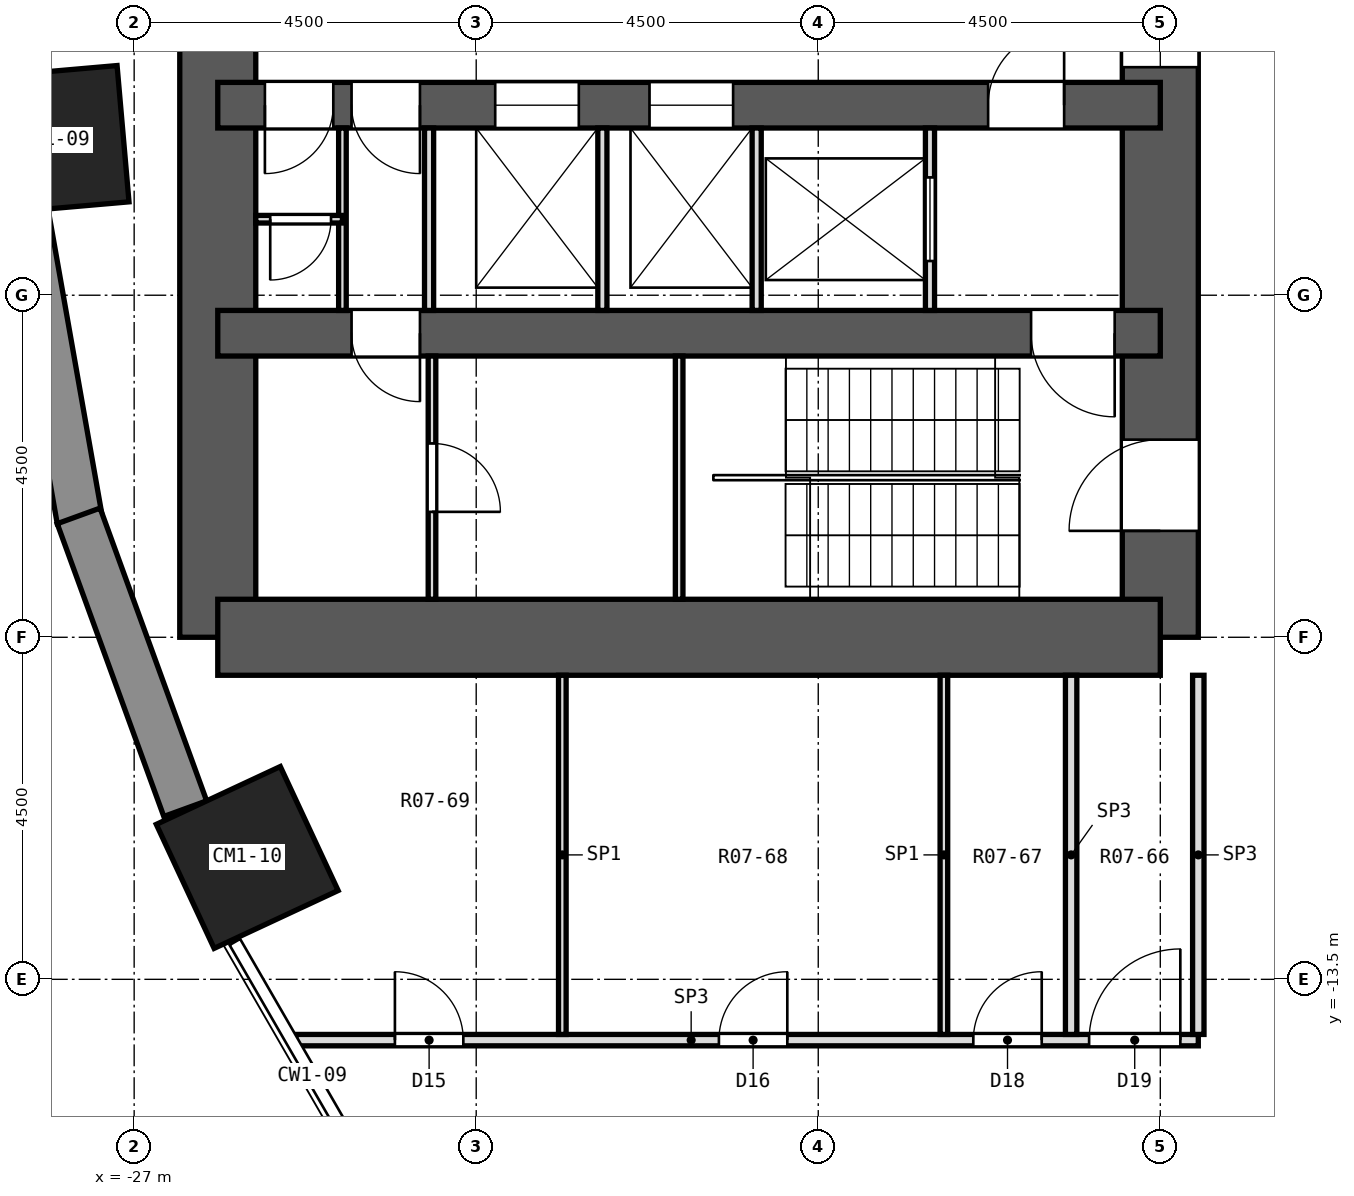
"""IFC4 building model, lengths in metres.
Left out: names, types, materials, properties, quantities, classifications, styles, units other than length and angle.
Written with IfcOpenShell. Run it as: python <this file> out.ifc"""

import sys

from ifc_helpers import new_model, si_unit, direction, frame, frame_2d, origin, origin_2d, place, context, subcontext, project, spatial, rectangle, extrude, element, fill, save


model = new_model("IFC4")
c1 = context("Model", 3, precision=1e-05, world=origin(), true_north=direction((0.0, 1.0)))
c2 = subcontext(c1, "Body", "Model", "MODEL_VIEW")
j1 = project(units=[si_unit("LENGTHUNIT", "METRE"), si_unit("PLANEANGLEUNIT", "RADIAN")], contexts=[c1])
p1 = place(None, origin())
s1 = spatial("IfcSite", under=j1, at=p1, CompositionType="ELEMENT")
p2 = place(p1, origin())
s2 = spatial("IfcBuilding", under=s1, at=p2, CompositionType="ELEMENT")
p3 = place(p2, frame((0.0, 0.0, 17.6)))
s3 = spatial("IfcBuildingStorey", under=s2, at=p3, CompositionType="ELEMENT", Elevation=17.6)
for number, where, z_axis, x_axis in (
    (1, (-28.043, -2.453, 0.0), (0.0, 0.0, 1.0), (-0.996, -0.087, 0.0)),
    (2, (-25.512, -11.897, 0.0), (0.0, 0.0, 1.0), (-0.906, -0.423, 0.0)),
):
    element("IfcColumn", number, at=place(p3, frame(where, z_axis=z_axis, x_axis=x_axis)), inside=s3, PredefinedType="COLUMN", context=c2, shape_type="SweptSolid", body=[
        extrude(rectangle(XDim=1.8, YDim=1.8, at=origin_2d()), origin(), (0.0, 0.0, 1.0), 4.2),
    ])
p4 = place(p3, frame((-13.5, -9.0, 0.0), z_axis=(0.0, 0.0, 1.0), x_axis=(0.0, 1.0, 0.0)))
e3 = element("IfcWall", 3, at=p4, inside=s3, PredefinedType="SHEAR", context=c2, shape_type="SweptSolid", body=[
    extrude(rectangle(XDim=18.0, YDim=1.0, at=frame_2d((9.0, 0.0))), origin(), (0.0, 0.0, 1.0), 4.2),
])
p5 = place(p4, frame((15.4, 0.0, 0.0)))
e4 = element("IfcOpeningElement", 4, at=p5, cuts=e3, PredefinedType="OPENING", context=c2, shape_type="SweptSolid", body=[
    extrude(rectangle(XDim=1.2, YDim=2.1, at=frame_2d((0.6, 1.05))), frame((0.0, 0.512, 0.0), z_axis=(0.0, -1.0, 0.0), x_axis=(1.0, 0.0, 0.0)), (0.0, 0.0, 1.0), 1.024),
])
p6 = place(p4, frame((1.4, 0.0, 0.0)))
e5 = element("IfcOpeningElement", 5, at=p6, cuts=e3, PredefinedType="OPENING", context=c2, shape_type="SweptSolid", body=[
    extrude(rectangle(XDim=1.2, YDim=2.1, at=frame_2d((0.6, 1.05))), frame((0.0, 0.512, 0.0), z_axis=(0.0, -1.0, 0.0), x_axis=(1.0, 0.0, 0.0)), (0.0, 0.0, 1.0), 1.024),
])
p7 = place(p4, frame((7.5, 0.0, 0.0)))
e6 = element("IfcOpeningElement", 6, at=p7, cuts=e3, PredefinedType="OPENING", context=c2, shape_type="SweptSolid", body=[
    extrude(rectangle(XDim=3.0, YDim=2.4, at=frame_2d((1.5, 1.2))), frame((0.0, 0.512, 0.0), z_axis=(0.0, -1.0, 0.0), x_axis=(1.0, 0.0, 0.0)), (0.0, 0.0, 1.0), 1.024),
])
p8 = place(p3, frame((-25.9, -9.0, 0.0), z_axis=(0.0, 0.0, 1.0), x_axis=(0.0, 1.0, 0.0)))
e7 = element("IfcWall", 7, at=p8, inside=s3, PredefinedType="SHEAR", context=c2, shape_type="SweptSolid", body=[
    extrude(rectangle(XDim=18.0, YDim=1.0, at=frame_2d((9.0, 0.0))), origin(), (0.0, 0.0, 1.0), 4.2),
])
p9 = place(p3, frame((-13.5, -9.0, 0.0), z_axis=(0.0, 0.0, 1.0), x_axis=(-1.0, 0.0, 0.0)))
e8 = element("IfcWall", 8, at=p9, inside=s3, PredefinedType="SHEAR", context=c2, shape_type="SweptSolid", body=[
    extrude(rectangle(XDim=12.4, YDim=1.0, at=frame_2d((6.2, 0.0))), origin(), (0.0, 0.0, 1.0), 4.2),
])
p10 = place(p3, frame((-13.5, -5.0, 0.0), z_axis=(0.0, 0.0, 1.0), x_axis=(-1.0, 0.0, 0.0)))
e9 = element("IfcWall", 9, at=p10, inside=s3, PredefinedType="SHEAR", context=c2, shape_type="SweptSolid", body=[
    extrude(rectangle(XDim=12.4, YDim=0.6, at=frame_2d((6.2, 0.0))), origin(), (0.0, 0.0, 1.0), 4.2),
])
p11 = place(p10, frame((9.74, 0.0, 0.0)))
e10 = element("IfcOpeningElement", 10, at=p11, cuts=e9, PredefinedType="OPENING", context=c2, shape_type="SweptSolid", body=[
    extrude(rectangle(XDim=0.9, YDim=2.1, at=frame_2d((0.45, 1.05))), frame((0.0, 0.312, 0.0), z_axis=(0.0, -1.0, 0.0), x_axis=(1.0, 0.0, 0.0)), (0.0, 0.0, 1.0), 0.624),
])
p12 = place(p10, frame((0.6, 0.0, 0.0)))
e11 = element("IfcOpeningElement", 11, at=p12, cuts=e9, PredefinedType="OPENING", context=c2, shape_type="SweptSolid", body=[
    extrude(rectangle(XDim=1.1, YDim=2.1, at=frame_2d((0.55, 1.05))), frame((0.0, 0.312, 0.0), z_axis=(0.0, -1.0, 0.0), x_axis=(1.0, 0.0, 0.0)), (0.0, 0.0, 1.0), 0.624),
])
p13 = place(p3, frame((-13.5, -2.0, 0.0), z_axis=(0.0, 0.0, 1.0), x_axis=(-1.0, 0.0, 0.0)))
e12 = element("IfcWall", 12, at=p13, inside=s3, PredefinedType="SHEAR", context=c2, shape_type="SweptSolid", body=[
    extrude(rectangle(XDim=12.4, YDim=0.6, at=frame_2d((6.2, 0.0))), origin(), (0.0, 0.0, 1.0), 4.2),
])
p14 = place(p13, frame((5.62, 0.0, 0.0)))
e13 = element("IfcOpeningElement", 13, at=p14, cuts=e12, PredefinedType="OPENING", context=c2, shape_type="SweptSolid", body=[
    extrude(rectangle(XDim=1.1, YDim=2.1, at=frame_2d((0.55, 1.05))), frame((0.0, 0.312, 0.0), z_axis=(0.0, -1.0, 0.0), x_axis=(1.0, 0.0, 0.0)), (0.0, 0.0, 1.0), 0.624),
])
p15 = place(p13, frame((7.65, 0.0, 0.0)))
e14 = element("IfcOpeningElement", 14, at=p15, cuts=e12, PredefinedType="OPENING", context=c2, shape_type="SweptSolid", body=[
    extrude(rectangle(XDim=1.1, YDim=2.1, at=frame_2d((0.55, 1.05))), frame((0.0, 0.312, 0.0), z_axis=(0.0, -1.0, 0.0), x_axis=(1.0, 0.0, 0.0)), (0.0, 0.0, 1.0), 0.624),
])
p16 = place(p13, frame((1.265, 0.0, 0.0)))
e15 = element("IfcOpeningElement", 15, at=p16, cuts=e12, PredefinedType="OPENING", context=c2, shape_type="SweptSolid", body=[
    extrude(rectangle(XDim=1.0, YDim=2.1, at=frame_2d((0.5, 1.05))), frame((0.0, 0.312, 0.0), z_axis=(0.0, -1.0, 0.0), x_axis=(1.0, 0.0, 0.0)), (0.0, 0.0, 1.0), 0.624),
])
p17 = place(p13, frame((9.74, 0.0, 0.0)))
e16 = element("IfcOpeningElement", 16, at=p17, cuts=e12, PredefinedType="OPENING", context=c2, shape_type="SweptSolid", body=[
    extrude(rectangle(XDim=0.9, YDim=2.1, at=frame_2d((0.45, 1.05))), frame((0.0, 0.312, 0.0), z_axis=(0.0, -1.0, 0.0), x_axis=(1.0, 0.0, 0.0)), (0.0, 0.0, 1.0), 0.624),
])
p18 = place(p13, frame((10.88, 0.0, 0.0)))
e17 = element("IfcOpeningElement", 17, at=p18, cuts=e12, PredefinedType="OPENING", context=c2, shape_type="SweptSolid", body=[
    extrude(rectangle(XDim=0.9, YDim=2.1, at=frame_2d((0.45, 1.05))), frame((0.0, 0.312, 0.0), z_axis=(0.0, -1.0, 0.0), x_axis=(1.0, 0.0, 0.0)), (0.0, 0.0, 1.0), 0.624),
])
p19 = place(p3, frame((-28.428, -3.417, 0.0), z_axis=(0.0, 0.0, 1.0), x_axis=(0.173673210505, -0.984803338719, 0.0)))
e18 = element("IfcWall", 18, at=p19, inside=s3, PredefinedType="SOLIDWALL", context=c2, shape_type="SweptSolid", body=[
    extrude(rectangle(XDim=4.099, YDim=0.6, at=frame_2d((2.05, 0.0))), origin(), (0.0, 0.0, 1.0), 3.6),
])
p20 = place(p3, frame((-27.73, -7.403, 0.0), z_axis=(0.0, 0.0, 1.0), x_axis=(0.342034744565, -0.939687306241, 0.0)))
e19 = element("IfcWall", 19, at=p20, inside=s3, PredefinedType="SOLIDWALL", context=c2, shape_type="SweptSolid", body=[
    extrude(rectangle(XDim=4.099, YDim=0.6, at=frame_2d((2.05, 0.0))), origin(), (0.0, 0.0, 1.0), 3.6),
])
p21 = place(p3, frame((-24.872, -14.3, 0.0), z_axis=(0.0, 0.0, 1.0), x_axis=(1.0, 0.0, 0.0)))
e20 = element("IfcWall", 20, at=p21, inside=s3, PredefinedType="PARTITIONING", context=c2, shape_type="SweptSolid", body=[
    extrude(rectangle(XDim=11.872, YDim=0.15, at=frame_2d((5.936, 0.0))), origin(), (0.0, 0.0, 1.0), 3.6),
])
p22 = place(p21, frame((1.302, 0.0, 0.0)))
e21 = element("IfcOpeningElement", 21, at=p22, cuts=e20, PredefinedType="OPENING", context=c2, shape_type="SweptSolid", body=[
    extrude(rectangle(XDim=0.9, YDim=2.1, at=frame_2d((0.45, 1.05))), frame((0.0, 0.087, 0.0), z_axis=(0.0, -1.0, 0.0), x_axis=(1.0, 0.0, 0.0)), (0.0, 0.0, 1.0), 0.174),
])
p23 = place(p21, frame((5.565, 0.0, 0.0)))
e22 = element("IfcOpeningElement", 22, at=p23, cuts=e20, PredefinedType="OPENING", context=c2, shape_type="SweptSolid", body=[
    extrude(rectangle(XDim=0.9, YDim=2.1, at=frame_2d((0.45, 1.05))), frame((0.0, 0.087, 0.0), z_axis=(0.0, -1.0, 0.0), x_axis=(1.0, 0.0, 0.0)), (0.0, 0.0, 1.0), 0.174),
])
p24 = place(p21, frame((8.912, 0.0, 0.0)))
e23 = element("IfcOpeningElement", 23, at=p24, cuts=e20, PredefinedType="OPENING", context=c2, shape_type="SweptSolid", body=[
    extrude(rectangle(XDim=0.9, YDim=2.1, at=frame_2d((0.45, 1.05))), frame((0.0, 0.087, 0.0), z_axis=(0.0, -1.0, 0.0), x_axis=(1.0, 0.0, 0.0)), (0.0, 0.0, 1.0), 0.174),
])
p25 = place(p21, frame((10.436, 0.0, 0.0)))
e24 = element("IfcOpeningElement", 24, at=p25, cuts=e20, PredefinedType="OPENING", context=c2, shape_type="SweptSolid", body=[
    extrude(rectangle(XDim=1.2, YDim=2.1, at=frame_2d((0.6, 1.05))), frame((0.0, 0.087, 0.0), z_axis=(0.0, -1.0, 0.0), x_axis=(1.0, 0.0, 0.0)), (0.0, 0.0, 1.0), 0.174),
])
for number, where, z_axis, x_axis in (
    (25, (-13.0, -14.225, 0.0), (0.0, 0.0, 1.0), (0.0, 1.0, 0.0)),
    (26, (-14.673, -14.225, 0.0), (0.0, 0.0, 1.0), (0.0, 1.0, 0.0)),
):
    element("IfcWall", number, at=place(p3, frame(where, z_axis=z_axis, x_axis=x_axis)), inside=s3, PredefinedType="PARTITIONING", context=c2, shape_type="SweptSolid", body=[
        extrude(rectangle(XDim=4.725, YDim=0.15, at=frame_2d((2.363, 0.0))), origin(), (0.0, 0.0, 1.0), 3.6),
    ])
for number, where, z_axis, x_axis in (
    (27, (-16.347, -14.225, 0.0), (0.0, 0.0, 1.0), (0.0, 1.0, 0.0)),
    (28, (-21.367, -14.225, 0.0), (0.0, 0.0, 1.0), (0.0, 1.0, 0.0)),
):
    element("IfcWall", number, at=place(p3, frame(where, z_axis=z_axis, x_axis=x_axis)), inside=s3, PredefinedType="PARTITIONING", context=c2, shape_type="SweptSolid", body=[
        extrude(rectangle(XDim=4.725, YDim=0.1, at=frame_2d((2.363, 0.0))), origin(), (0.0, 0.0, 1.0), 3.6),
    ])
p26 = place(p3, frame((-16.53, -4.7, 0.0), z_axis=(0.0, 0.0, 1.0), x_axis=(0.0, 1.0, 0.0)))
e29 = element("IfcWall", 29, at=p26, inside=s3, PredefinedType="PARTITIONING", context=c2, shape_type="SweptSolid", body=[
    extrude(rectangle(XDim=2.4, YDim=0.12, at=frame_2d((1.2, 0.0))), origin(), (0.0, 0.0, 1.0), 3.6),
])
p27 = place(p26, frame((0.65, 0.0, 0.0)))
e30 = element("IfcOpeningElement", 30, at=p27, cuts=e29, PredefinedType="OPENING", context=c2, shape_type="SweptSolid", body=[
    extrude(rectangle(XDim=1.1, YDim=2.1, at=frame_2d((0.55, 1.05))), frame((0.0, 0.072, 0.0), z_axis=(0.0, -1.0, 0.0), x_axis=(1.0, 0.0, 0.0)), (0.0, 0.0, 1.0), 0.144),
])
for number, where, z_axis, x_axis in (
    (31, (-18.81, -4.7, 0.0), (0.0, 0.0, 1.0), (0.0, 1.0, 0.0)),
    (32, (-20.84, -4.7, 0.0), (0.0, 0.0, 1.0), (0.0, 1.0, 0.0)),
    (33, (-23.12, -4.7, 0.0), (0.0, 0.0, 1.0), (0.0, 1.0, 0.0)),
):
    element("IfcWall", number, at=place(p3, frame(where, z_axis=z_axis, x_axis=x_axis)), inside=s3, PredefinedType="PARTITIONING", context=c2, shape_type="SweptSolid", body=[
        extrude(rectangle(XDim=2.4, YDim=0.12, at=frame_2d((1.2, 0.0))), origin(), (0.0, 0.0, 1.0), 3.6),
    ])
p28 = place(p3, frame((-24.26, -4.7, 0.0), z_axis=(0.0, 0.0, 1.0), x_axis=(0.0, 1.0, 0.0)))
e34 = element("IfcWall", 34, at=p28, inside=s3, PredefinedType="PARTITIONING", context=c2, shape_type="SweptSolid", body=[
    extrude(rectangle(XDim=2.4, YDim=0.1, at=frame_2d((1.2, 0.0))), origin(), (0.0, 0.0, 1.0), 3.6),
])
p29 = place(p3, frame((-24.26, -3.5, 0.0), z_axis=(0.0, 0.0, 1.0), x_axis=(-1.0, 0.0, 0.0)))
e35 = element("IfcWall", 35, at=p29, inside=s3, PredefinedType="PARTITIONING", context=c2, shape_type="SweptSolid", body=[
    extrude(rectangle(XDim=1.14, YDim=0.1, at=frame_2d((0.57, 0.0))), origin(), (0.0, 0.0, 1.0), 3.6),
])
p30 = place(p29, frame((0.15, 0.0, 0.0)))
e36 = element("IfcOpeningElement", 36, at=p30, cuts=e35, PredefinedType="OPENING", context=c2, shape_type="SweptSolid", body=[
    extrude(rectangle(XDim=0.8, YDim=2.1, at=frame_2d((0.4, 1.05))), frame((0.0, 0.062, 0.0), z_axis=(0.0, -1.0, 0.0), x_axis=(1.0, 0.0, 0.0)), (0.0, 0.0, 1.0), 0.124),
])
p31 = place(p3, frame((-19.83, -8.5, 0.0), z_axis=(0.0, 0.0, 1.0), x_axis=(0.0, 1.0, 0.0)))
e37 = element("IfcWall", 37, at=p31, inside=s3, PredefinedType="PARTITIONING", context=c2, shape_type="SweptSolid", body=[
    extrude(rectangle(XDim=3.2, YDim=0.1, at=frame_2d((1.6, 0.0))), origin(), (0.0, 0.0, 1.0), 3.6),
])
p32 = place(p3, frame((-23.082, -8.5, 0.0), z_axis=(0.0, 0.0, 1.0), x_axis=(0.0, 1.0, 0.0)))
e38 = element("IfcWall", 38, at=p32, inside=s3, PredefinedType="PARTITIONING", context=c2, shape_type="SweptSolid", body=[
    extrude(rectangle(XDim=3.2, YDim=0.1, at=frame_2d((1.6, 0.0))), origin(), (0.0, 0.0, 1.0), 3.6),
])
p33 = place(p32, frame((1.15, 0.0, 0.0)))
e39 = element("IfcOpeningElement", 39, at=p33, cuts=e38, PredefinedType="OPENING", context=c2, shape_type="SweptSolid", body=[
    extrude(rectangle(XDim=0.9, YDim=2.1, at=frame_2d((0.45, 1.05))), frame((0.0, 0.062, 0.0), z_axis=(0.0, -1.0, 0.0), x_axis=(1.0, 0.0, 0.0)), (0.0, 0.0, 1.0), 0.124),
])
p34 = place(p22, origin())
e40 = element("IfcDoor", 40, at=p34, inside=s3, OperationType="SINGLE_SWING_LEFT", PredefinedType="DOOR", context=c2, shape_type="SweptSolid", body=[
    extrude(rectangle(XDim=0.9, YDim=2.1, at=frame_2d((0.45, 1.05))), frame((0.0, 0.025, 0.0), z_axis=(0.0, -1.0, 0.0), x_axis=(1.0, 0.0, 0.0)), (0.0, 0.0, 1.0), 0.05),
])
fill(e21, e40)
p35 = place(p23, origin())
e41 = element("IfcDoor", 41, at=p35, inside=s3, OperationType="SINGLE_SWING_RIGHT", PredefinedType="DOOR", context=c2, shape_type="SweptSolid", body=[
    extrude(rectangle(XDim=0.9, YDim=2.1, at=frame_2d((0.45, 1.05))), frame((0.0, 0.025, 0.0), z_axis=(0.0, -1.0, 0.0), x_axis=(1.0, 0.0, 0.0)), (0.0, 0.0, 1.0), 0.05),
])
fill(e22, e41)
p36 = place(p24, origin())
e42 = element("IfcDoor", 42, at=p36, inside=s3, OperationType="SINGLE_SWING_RIGHT", PredefinedType="DOOR", context=c2, shape_type="SweptSolid", body=[
    extrude(rectangle(XDim=0.9, YDim=2.1, at=frame_2d((0.45, 1.05))), frame((0.0, 0.025, 0.0), z_axis=(0.0, -1.0, 0.0), x_axis=(1.0, 0.0, 0.0)), (0.0, 0.0, 1.0), 0.05),
])
fill(e23, e42)
p37 = place(p25, origin())
e43 = element("IfcDoor", 43, at=p37, inside=s3, OperationType="SINGLE_SWING_RIGHT", PredefinedType="DOOR", context=c2, shape_type="SweptSolid", body=[
    extrude(rectangle(XDim=1.2, YDim=2.1, at=frame_2d((0.6, 1.05))), frame((0.0, 0.025, 0.0), z_axis=(0.0, -1.0, 0.0), x_axis=(1.0, 0.0, 0.0)), (0.0, 0.0, 1.0), 0.05),
])
fill(e24, e43)
p38 = place(p27, origin())
e44 = element("IfcDoor", 44, at=p38, inside=s3, OperationType="DOUBLE_DOOR_SLIDING", PredefinedType="DOOR", context=c2, shape_type="SweptSolid", body=[
    extrude(rectangle(XDim=1.1, YDim=2.1, at=frame_2d((0.55, 1.05))), frame((0.0, 0.025, 0.0), z_axis=(0.0, -1.0, 0.0), x_axis=(1.0, 0.0, 0.0)), (0.0, 0.0, 1.0), 0.05),
])
fill(e30, e44)
p39 = place(p14, origin())
e45 = element("IfcDoor", 45, at=p39, inside=s3, OperationType="DOUBLE_DOOR_SLIDING", PredefinedType="DOOR", context=c2, shape_type="SweptSolid", body=[
    extrude(rectangle(XDim=1.1, YDim=2.1, at=frame_2d((0.55, 1.05))), frame((0.0, 0.025, 0.0), z_axis=(0.0, -1.0, 0.0), x_axis=(1.0, 0.0, 0.0)), (0.0, 0.0, 1.0), 0.05),
])
fill(e13, e45)
p40 = place(p15, origin())
e46 = element("IfcDoor", 46, at=p40, inside=s3, OperationType="DOUBLE_DOOR_SLIDING", PredefinedType="DOOR", context=c2, shape_type="SweptSolid", body=[
    extrude(rectangle(XDim=1.1, YDim=2.1, at=frame_2d((0.55, 1.05))), frame((0.0, 0.025, 0.0), z_axis=(0.0, -1.0, 0.0), x_axis=(1.0, 0.0, 0.0)), (0.0, 0.0, 1.0), 0.05),
])
fill(e14, e46)
p41 = place(p16, frame((1.0, 0.0, 0.0), z_axis=(0.0, 0.0, 1.0), x_axis=(-1.0, 0.0, 0.0)))
e47 = element("IfcDoor", 47, at=p41, inside=s3, OperationType="SINGLE_SWING_RIGHT", PredefinedType="DOOR", context=c2, shape_type="SweptSolid", body=[
    extrude(rectangle(XDim=1.0, YDim=2.1, at=frame_2d((0.5, 1.05))), frame((0.0, 0.025, 0.0), z_axis=(0.0, -1.0, 0.0), x_axis=(1.0, 0.0, 0.0)), (0.0, 0.0, 1.0), 0.05),
])
fill(e15, e47)
p42 = place(p17, origin())
e48 = element("IfcDoor", 48, at=p42, inside=s3, OperationType="SINGLE_SWING_LEFT", PredefinedType="DOOR", context=c2, shape_type="SweptSolid", body=[
    extrude(rectangle(XDim=0.9, YDim=2.1, at=frame_2d((0.45, 1.05))), frame((0.0, 0.025, 0.0), z_axis=(0.0, -1.0, 0.0), x_axis=(1.0, 0.0, 0.0)), (0.0, 0.0, 1.0), 0.05),
])
fill(e16, e48)
p43 = place(p18, origin())
e49 = element("IfcDoor", 49, at=p43, inside=s3, OperationType="SINGLE_SWING_RIGHT", PredefinedType="DOOR", context=c2, shape_type="SweptSolid", body=[
    extrude(rectangle(XDim=0.9, YDim=2.1, at=frame_2d((0.45, 1.05))), frame((0.0, 0.025, 0.0), z_axis=(0.0, -1.0, 0.0), x_axis=(1.0, 0.0, 0.0)), (0.0, 0.0, 1.0), 0.05),
])
fill(e17, e49)
p44 = place(p30, origin())
e50 = element("IfcDoor", 50, at=p44, inside=s3, OperationType="SINGLE_SWING_RIGHT", PredefinedType="DOOR", context=c2, shape_type="SweptSolid", body=[
    extrude(rectangle(XDim=0.8, YDim=2.1, at=frame_2d((0.4, 1.05))), frame((0.0, 0.025, 0.0), z_axis=(0.0, -1.0, 0.0), x_axis=(1.0, 0.0, 0.0)), (0.0, 0.0, 1.0), 0.05),
])
fill(e36, e50)
p45 = place(p33, frame((0.9, 0.0, 0.0), z_axis=(0.0, 0.0, 1.0), x_axis=(-1.0, 0.0, 0.0)))
e51 = element("IfcDoor", 51, at=p45, inside=s3, OperationType="SINGLE_SWING_RIGHT", PredefinedType="DOOR", context=c2, shape_type="SweptSolid", body=[
    extrude(rectangle(XDim=0.9, YDim=2.1, at=frame_2d((0.45, 1.05))), frame((0.0, 0.025, 0.0), z_axis=(0.0, -1.0, 0.0), x_axis=(1.0, 0.0, 0.0)), (0.0, 0.0, 1.0), 0.05),
])
fill(e39, e51)
p46 = place(p11, origin())
e52 = element("IfcDoor", 52, at=p46, inside=s3, OperationType="SINGLE_SWING_LEFT", PredefinedType="DOOR", context=c2, shape_type="SweptSolid", body=[
    extrude(rectangle(XDim=0.9, YDim=2.1, at=frame_2d((0.45, 1.05))), frame((0.0, 0.025, 0.0), z_axis=(0.0, -1.0, 0.0), x_axis=(1.0, 0.0, 0.0)), (0.0, 0.0, 1.0), 0.05),
])
fill(e10, e52)
p47 = place(p12, origin())
e53 = element("IfcDoor", 53, at=p47, inside=s3, OperationType="SINGLE_SWING_LEFT", PredefinedType="DOOR", context=c2, shape_type="SweptSolid", body=[
    extrude(rectangle(XDim=1.1, YDim=2.1, at=frame_2d((0.55, 1.05))), frame((0.0, 0.025, 0.0), z_axis=(0.0, -1.0, 0.0), x_axis=(1.0, 0.0, 0.0)), (0.0, 0.0, 1.0), 0.05),
])
fill(e11, e53)
p48 = place(p6, origin())
e54 = element("IfcDoor", 54, at=p48, inside=s3, OperationType="SINGLE_SWING_LEFT", PredefinedType="DOOR", context=c2, shape_type="SweptSolid", body=[
    extrude(rectangle(XDim=1.2, YDim=2.1, at=frame_2d((0.6, 1.05))), frame((0.0, 0.025, 0.0), z_axis=(0.0, -1.0, 0.0), x_axis=(1.0, 0.0, 0.0)), (0.0, 0.0, 1.0), 0.05),
])
fill(e5, e54)
p49 = place(p7, origin())
e55 = element("IfcDoor", 55, at=p49, inside=s3, OperationType="DOUBLE_DOOR_SLIDING", PredefinedType="DOOR", context=c2, shape_type="SweptSolid", body=[
    extrude(rectangle(XDim=3.0, YDim=2.4, at=frame_2d((1.5, 1.2))), frame((0.0, 0.025, 0.0), z_axis=(0.0, -1.0, 0.0), x_axis=(1.0, 0.0, 0.0)), (0.0, 0.0, 1.0), 0.05),
])
fill(e6, e55)
save(model, sys.argv[1])
